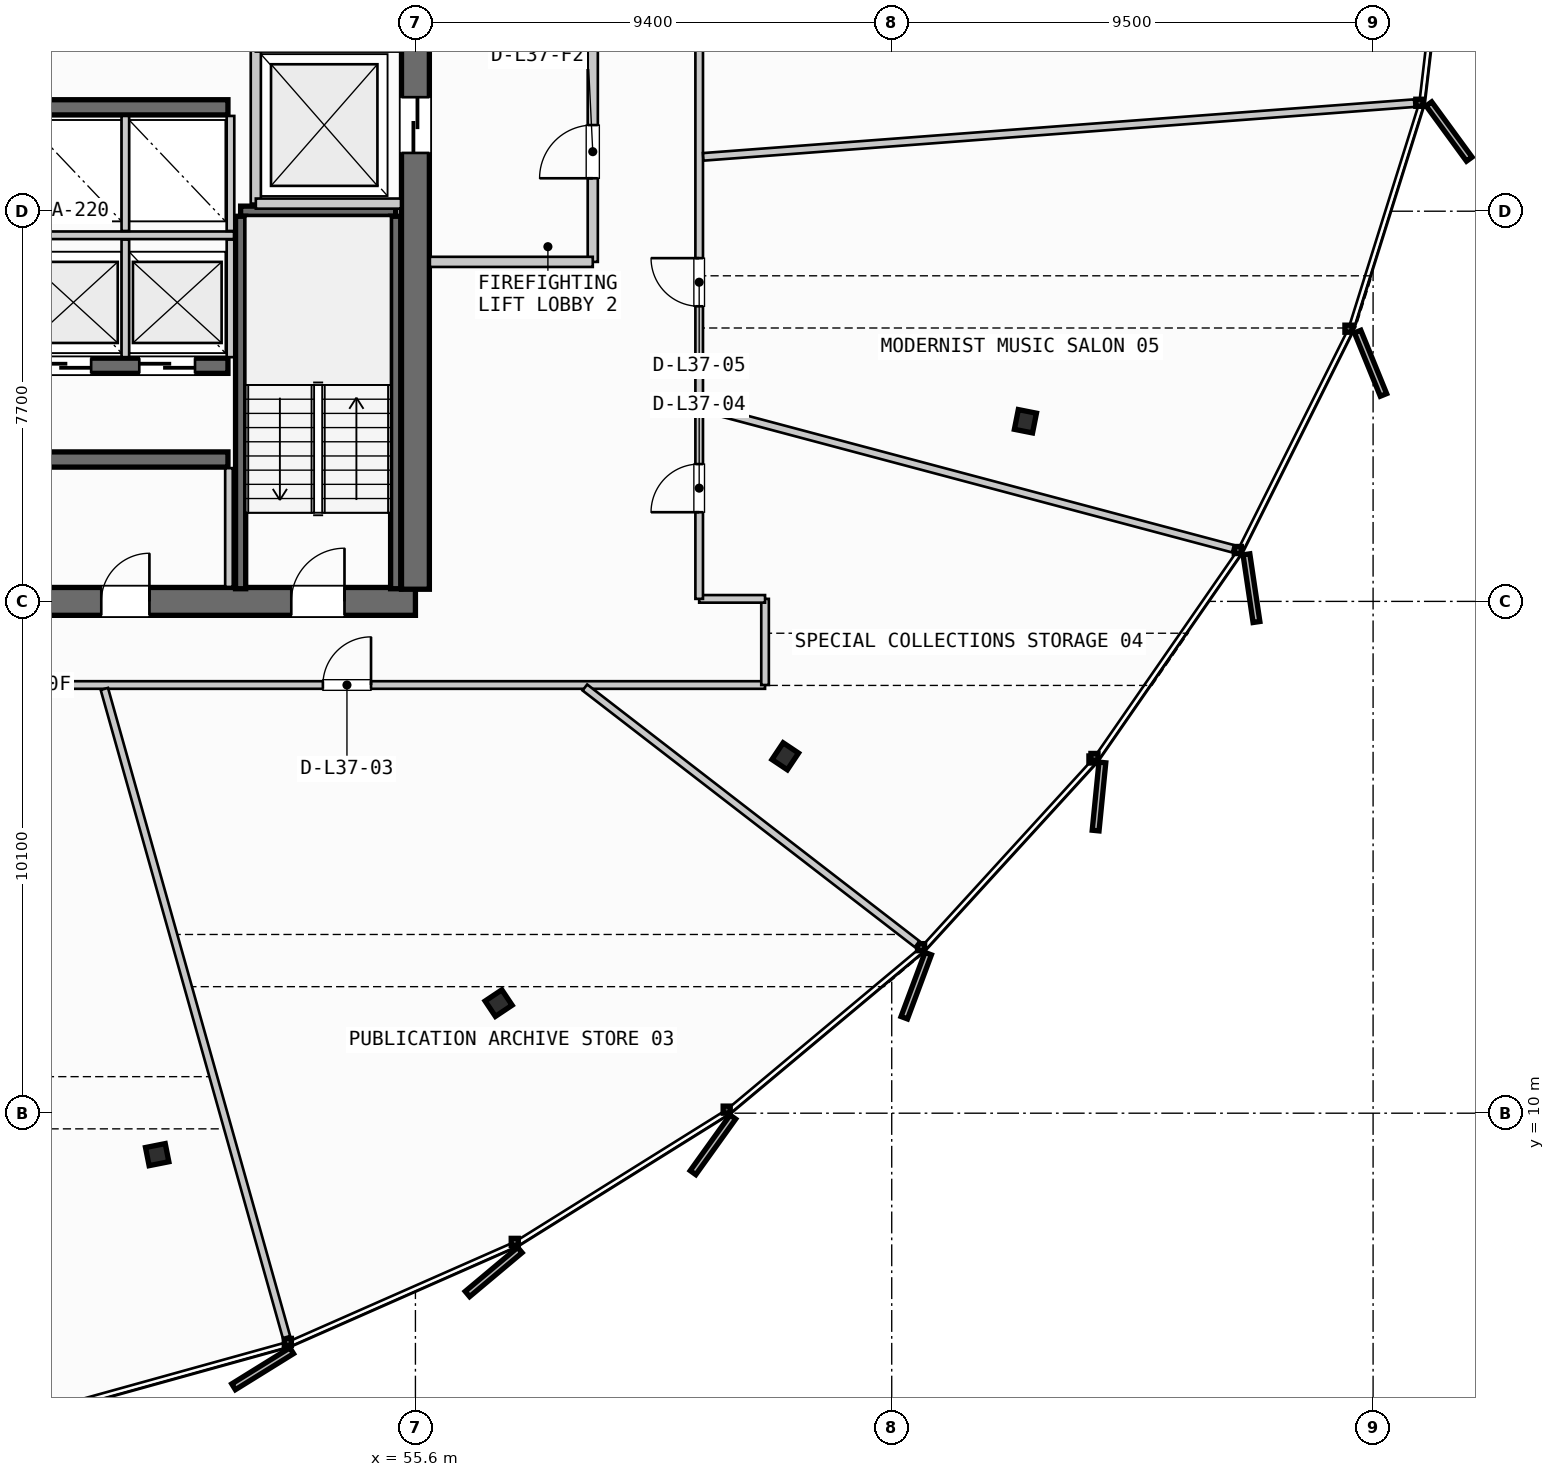
"""IFC4 building model, lengths in metres.
Left out: names, types, materials, properties, quantities, classifications, styles, units other than length and angle.
Written with IfcOpenShell. Run it as: python <this file> out.ifc"""

import sys

from ifc_helpers import new_model, si_unit, direction, frame, frame_2d, origin, origin_2d, place, context, subcontext, project, spatial, rectangle, i_section, extrude, source, transform, mapped, element, fill, save


model = new_model("IFC4")
c1 = context("Model", 3, precision=1e-05, world=origin(), true_north=direction((0.0, 1.0)))
c2 = subcontext(c1, "Body", "Model", "MODEL_VIEW")
j1 = project(units=[si_unit("LENGTHUNIT", "METRE"), si_unit("PLANEANGLEUNIT", "RADIAN")], contexts=[c1])
p1 = place(None, origin())
s1 = spatial("IfcSite", under=j1, at=p1, CompositionType="ELEMENT")
p2 = place(p1, origin())
s2 = spatial("IfcBuilding", under=s1, at=p2, CompositionType="ELEMENT")
p3 = place(p2, frame((0.0, 0.0, 146.55)))
s3 = spatial("IfcBuildingStorey", under=s2, at=p3, CompositionType="ELEMENT", Elevation=146.55)
p4 = place(p3, frame((38.0, 20.1, 0.0), z_axis=(0.0, 0.0, 1.0), x_axis=(1.0, 0.0, 0.0)))
e1 = element("IfcWall", 1, at=p4, inside=s3, PredefinedType="SHEAR", context=c2, shape_type="SweptSolid", body=[
    extrude(rectangle(XDim=17.6, YDim=0.55, at=frame_2d((8.8, 0.0))), origin(), (0.0, 0.0, 1.0), 3.3),
])
p5 = place(p4, frame((1.4, 0.0, 0.0)))
e2 = element("IfcOpeningElement", 2, at=p5, cuts=e1, PredefinedType="OPENING", context=c2, shape_type="SweptSolid", body=[
    extrude(rectangle(XDim=1.05, YDim=2.15, at=frame_2d((0.525, 1.075))), frame((0.0, 0.285, 0.0), z_axis=(0.0, -1.0, 0.0), x_axis=(1.0, 0.0, 0.0)), (0.0, 0.0, 1.0), 0.57),
])
p6 = place(p4, frame((15.15, 0.0, 0.0)))
e3 = element("IfcOpeningElement", 3, at=p6, cuts=e1, PredefinedType="OPENING", context=c2, shape_type="SweptSolid", body=[
    extrude(rectangle(XDim=1.05, YDim=2.15, at=frame_2d((0.525, 1.075))), frame((0.0, 0.285, 0.0), z_axis=(0.0, -1.0, 0.0), x_axis=(1.0, 0.0, 0.0)), (0.0, 0.0, 1.0), 0.57),
])
p7 = place(p4, frame((5.25, 0.0, 0.0)))
e4 = element("IfcOpeningElement", 4, at=p7, cuts=e1, PredefinedType="OPENING", context=c2, shape_type="SweptSolid", body=[
    extrude(rectangle(XDim=0.95, YDim=2.15, at=frame_2d((0.475, 1.075))), frame((0.0, 0.285, 0.0), z_axis=(0.0, -1.0, 0.0), x_axis=(1.0, 0.0, 0.0)), (0.0, 0.0, 1.0), 0.57),
])
p8 = place(p4, frame((11.4, 0.0, 0.0)))
e5 = element("IfcOpeningElement", 5, at=p8, cuts=e1, PredefinedType="OPENING", context=c2, shape_type="SweptSolid", body=[
    extrude(rectangle(XDim=0.95, YDim=2.15, at=frame_2d((0.475, 1.075))), frame((0.0, 0.285, 0.0), z_axis=(0.0, -1.0, 0.0), x_axis=(1.0, 0.0, 0.0)), (0.0, 0.0, 1.0), 0.57),
])
p9 = place(p3, frame((55.6, 20.34, 0.0), z_axis=(0.0, 0.0, 1.0), x_axis=(0.0, 1.0, 0.0)))
e6 = element("IfcWall", 6, at=p9, inside=s3, PredefinedType="SHEAR", context=c2, shape_type="SweptSolid", body=[
    extrude(rectangle(XDim=14.92, YDim=0.55, at=frame_2d((7.46, 0.0))), origin(), (0.0, 0.0, 1.0), 3.3),
])
p10 = place(p9, frame((12.71, 0.0, 0.0)))
e7 = element("IfcOpeningElement", 7, at=p10, cuts=e6, PredefinedType="OPENING", context=c2, shape_type="SweptSolid", body=[
    extrude(rectangle(XDim=1.05, YDim=2.15, at=frame_2d((0.525, 1.075))), frame((0.0, 0.285, 0.0), z_axis=(0.0, -1.0, 0.0), x_axis=(1.0, 0.0, 0.0)), (0.0, 0.0, 1.0), 0.57),
])
p11 = place(p9, frame((8.61, 0.0, 0.0)))
e8 = element("IfcOpeningElement", 8, at=p11, cuts=e6, PredefinedType="OPENING", context=c2, shape_type="SweptSolid", body=[
    extrude(rectangle(XDim=1.1, YDim=2.2, at=frame_2d((0.55, 1.1))), frame((0.0, 0.285, 0.0), z_axis=(0.0, -1.0, 0.0), x_axis=(1.0, 0.0, 0.0)), (0.0, 0.0, 1.0), 0.57),
])
p12 = place(p3, frame((47.65, 22.9, 0.0), z_axis=(0.0, 0.0, 1.0), x_axis=(1.0, 0.0, 0.0)))
e9 = element("IfcWall", 9, at=p12, inside=s3, PredefinedType="SHEAR", context=c2, shape_type="SweptSolid", body=[
    extrude(rectangle(XDim=4.25, YDim=0.3, at=frame_2d((2.125, 0.0))), origin(), (0.0, 0.0, 1.0), 3.3),
])
p13 = place(p3, frame((47.65, 24.75, 0.0), z_axis=(0.0, 0.0, 1.0), x_axis=(1.0, 0.0, 0.0)))
e10 = element("IfcWall", 10, at=p13, inside=s3, PredefinedType="SHEAR", context=c2, shape_type="SweptSolid", body=[
    extrude(rectangle(XDim=4.25, YDim=0.3, at=frame_2d((2.125, 0.0))), origin(), (0.0, 0.0, 1.0), 3.3),
])
p14 = place(p13, frame((0.45, 0.0, 0.0)))
e11 = element("IfcOpeningElement", 11, at=p14, cuts=e10, PredefinedType="OPENING", context=c2, shape_type="SweptSolid", body=[
    extrude(rectangle(XDim=1.1, YDim=2.2, at=frame_2d((0.55, 1.1))), frame((0.0, 0.16, 0.0), z_axis=(0.0, -1.0, 0.0), x_axis=(1.0, 0.0, 0.0)), (0.0, 0.0, 1.0), 0.32),
])
p15 = place(p13, frame((2.5, 0.0, 0.0)))
e12 = element("IfcOpeningElement", 12, at=p15, cuts=e10, PredefinedType="OPENING", context=c2, shape_type="SweptSolid", body=[
    extrude(rectangle(XDim=1.1, YDim=2.2, at=frame_2d((0.55, 1.1))), frame((0.0, 0.16, 0.0), z_axis=(0.0, -1.0, 0.0), x_axis=(1.0, 0.0, 0.0)), (0.0, 0.0, 1.0), 0.32),
])
p16 = place(p3, frame((47.65, 29.85, 0.0), z_axis=(0.0, 0.0, 1.0), x_axis=(1.0, 0.0, 0.0)))
e13 = element("IfcWall", 13, at=p16, inside=s3, PredefinedType="SHEAR", context=c2, shape_type="SweptSolid", body=[
    extrude(rectangle(XDim=4.25, YDim=0.3, at=frame_2d((2.125, 0.0))), origin(), (0.0, 0.0, 1.0), 3.3),
])
m1 = source(origin(), c2, "Body", "SweptSolid", [
    extrude(i_section(OverallWidth=0.397, OverallDepth=0.365, WebThickness=0.028, FlangeThickness=0.044, FilletRadius=0.015, at=origin_2d()), origin(), (0.0, 0.0, 1.0), 3.3),
])
for number, where, z_axis, x_axis in (
    (14, (50.503, 9.182, 0.0), (0.0, 0.0, 1.0), (0.195, -0.981, 0.0)),
    (15, (57.242, 12.172, 0.0), (0.0, 0.0, 1.0), (0.556, -0.831, 0.0)),
    (16, (62.899, 17.043, 0.0), (0.0, 0.0, 1.0), (0.831, -0.556, 0.0)),
    (17, (67.639, 23.655, 0.0), (0.0, 0.0, 1.0), (0.981, -0.195, 0.0)),
):
    element("IfcColumn", number, at=place(p3, frame(where, z_axis=z_axis, x_axis=x_axis)), inside=s3, PredefinedType="COLUMN", context=c2, shape_type="MappedRepresentation", body=[
        mapped(m1, transform((0.0, 0.0, 0.0), scale=1.0)),
    ])
p17 = place(p3, frame((52.15, 27.8, 0.0), z_axis=(0.0, 0.0, 1.0), x_axis=(1.0, 0.0, 0.0)))
e18 = element("IfcWall", 18, at=p17, inside=s3, PredefinedType="SHEAR", context=c2, shape_type="SweptSolid", body=[
    extrude(rectangle(XDim=3.06, YDim=0.2, at=frame_2d((1.53, 0.0))), origin(), (0.0, 0.0, 1.0), 3.3),
])
for number, where, z_axis, x_axis in (
    (19, (55.21, 27.7, 0.0), (0.0, 0.0, 1.0), (0.0, -1.0, 0.0)),
    (20, (52.15, 20.35, 0.0), (0.0, 0.0, 1.0), (0.0, 1.0, 0.0)),
):
    element("IfcWall", number, at=place(p3, frame(where, z_axis=z_axis, x_axis=x_axis)), inside=s3, PredefinedType="SHEAR", context=c2, shape_type="SweptSolid", body=[
        extrude(rectangle(XDim=7.35, YDim=0.2, at=frame_2d((3.675, 0.0))), origin(), (0.0, 0.0, 1.0), 3.3),
    ])
p18 = place(p3, frame((52.45, 27.95, 0.0), z_axis=(0.0, 0.0, 1.0), x_axis=(0.0, 1.0, 0.0)))
e21 = element("IfcWall", 21, at=p18, inside=s3, PredefinedType="PARTITIONING", context=c2, shape_type="SweptSolid", body=[
    extrude(rectangle(XDim=3.1, YDim=0.2, at=frame_2d((1.55, 0.0))), origin(), (0.0, 0.0, 1.0), 2.305),
])
p19 = place(p3, frame((52.45, 27.95, 0.0), z_axis=(0.0, 0.0, 1.0), x_axis=(1.0, 0.0, 0.0)))
e22 = element("IfcWall", 22, at=p19, inside=s3, PredefinedType="PARTITIONING", context=c2, shape_type="SweptSolid", body=[
    extrude(rectangle(XDim=2.865, YDim=0.2, at=frame_2d((1.433, 0.0))), origin(), (0.0, 0.0, 1.0), 2.305),
])
p20 = place(p3, frame((59.1, 26.8, 0.0), z_axis=(0.0, 0.0, 1.0), x_axis=(0.0, 1.0, 0.0)))
e23 = element("IfcWall", 23, at=p20, inside=s3, PredefinedType="PARTITIONING", context=c2, shape_type="SweptSolid", body=[
    extrude(rectangle(XDim=4.4, YDim=0.2, at=frame_2d((2.2, 0.0))), origin(), (0.0, 0.0, 1.0), 2.305),
])
p21 = place(p20, frame((1.65, 0.0, 0.0)))
e24 = element("IfcOpeningElement", 24, at=p21, cuts=e23, PredefinedType="OPENING", context=c2, shape_type="SweptSolid", body=[
    extrude(rectangle(XDim=1.05, YDim=2.15, at=frame_2d((0.525, 1.075))), frame((0.0, 0.11, 0.0), z_axis=(0.0, -1.0, 0.0), x_axis=(1.0, 0.0, 0.0)), (0.0, 0.0, 1.0), 0.22),
])
p22 = place(p3, frame((55.885, 26.8, 0.0), z_axis=(0.0, 0.0, 1.0), x_axis=(1.0, 0.0, 0.0)))
e25 = element("IfcWall", 25, at=p22, inside=s3, PredefinedType="PARTITIONING", context=c2, shape_type="SweptSolid", body=[
    extrude(rectangle(XDim=3.215, YDim=0.2, at=frame_2d((1.607, 0.0))), origin(), (0.0, 0.0, 1.0), 2.305),
])
p23 = place(p3, frame((51.92, 20.385, 0.0), z_axis=(0.0, 0.0, 1.0), x_axis=(0.0, 1.0, 0.0)))
e26 = element("IfcWall", 26, at=p23, inside=s3, PredefinedType="PARTITIONING", context=c2, shape_type="SweptSolid", body=[
    extrude(rectangle(XDim=2.345, YDim=0.15, at=frame_2d((1.172, 0.0))), origin(), (0.0, 0.0, 1.0), 2.305),
])
p24 = place(p3, frame((47.7, 27.325, 0.0), z_axis=(0.0, 0.0, 1.0), x_axis=(1.0, 0.0, 0.0)))
e27 = element("IfcWall", 27, at=p24, inside=s3, PredefinedType="PARTITIONING", context=c2, shape_type="SweptSolid", body=[
    extrude(rectangle(XDim=4.32, YDim=0.15, at=frame_2d((2.16, 0.0))), origin(), (0.0, 0.0, 1.0), 2.305),
])
for number, where, z_axis, x_axis in (
    (28, (49.875, 24.92, 0.0), (0.0, 0.0, 1.0), (0.0, 1.0, 0.0)),
    (29, (51.95, 24.92, 0.0), (0.0, 0.0, 1.0), (0.0, 1.0, 0.0)),
):
    element("IfcWall", number, at=place(p3, frame(where, z_axis=z_axis, x_axis=x_axis)), inside=s3, PredefinedType="PARTITIONING", context=c2, shape_type="SweptSolid", body=[
        extrude(rectangle(XDim=2.32, YDim=0.15, at=frame_2d((1.16, 0.0))), origin(), (0.0, 0.0, 1.0), 2.305),
    ])
for number, where, z_axis, x_axis in (
    (30, (49.875, 27.41, 0.0), (0.0, 0.0, 1.0), (0.0, 1.0, 0.0)),
    (31, (51.95, 27.41, 0.0), (0.0, 0.0, 1.0), (0.0, 1.0, 0.0)),
):
    element("IfcWall", number, at=place(p3, frame(where, z_axis=z_axis, x_axis=x_axis)), inside=s3, PredefinedType="PARTITIONING", context=c2, shape_type="SweptSolid", body=[
        extrude(rectangle(XDim=2.27, YDim=0.15, at=frame_2d((1.135, 0.0))), origin(), (0.0, 0.0, 1.0), 2.305),
    ])
p25 = place(p3, frame((31.1, 18.45, 0.0), z_axis=(0.0, 0.0, 1.0), x_axis=(1.0, 0.0, 0.0)))
e32 = element("IfcWall", 32, at=p25, inside=s3, PredefinedType="PARTITIONING", context=c2, shape_type="SweptSolid", body=[
    extrude(rectangle(XDim=31.4, YDim=0.15, at=frame_2d((15.7, 0.0))), origin(), (0.0, 0.0, 1.0), 2.305),
])
p26 = place(p25, frame((6.281, 0.0, 0.0)))
e33 = element("IfcOpeningElement", 33, at=p26, cuts=e32, PredefinedType="OPENING", context=c2, shape_type="SweptSolid", body=[
    extrude(rectangle(XDim=0.95, YDim=2.15, at=frame_2d((0.475, 1.075))), frame((0.0, 0.085, 0.0), z_axis=(0.0, -1.0, 0.0), x_axis=(1.0, 0.0, 0.0)), (0.0, 0.0, 1.0), 0.17),
])
p27 = place(p25, frame((14.09, 0.0, 0.0)))
e34 = element("IfcOpeningElement", 34, at=p27, cuts=e32, PredefinedType="OPENING", context=c2, shape_type="SweptSolid", body=[
    extrude(rectangle(XDim=0.95, YDim=2.15, at=frame_2d((0.475, 1.075))), frame((0.0, 0.085, 0.0), z_axis=(0.0, -1.0, 0.0), x_axis=(1.0, 0.0, 0.0)), (0.0, 0.0, 1.0), 0.17),
])
p28 = place(p25, frame((22.674, 0.0, 0.0)))
e35 = element("IfcOpeningElement", 35, at=p28, cuts=e32, PredefinedType="OPENING", context=c2, shape_type="SweptSolid", body=[
    extrude(rectangle(XDim=0.95, YDim=2.15, at=frame_2d((0.475, 1.075))), frame((0.0, 0.085, 0.0), z_axis=(0.0, -1.0, 0.0), x_axis=(1.0, 0.0, 0.0)), (0.0, 0.0, 1.0), 0.17),
])
p29 = place(p3, frame((62.5, 18.45, 0.0), z_axis=(0.0, 0.0, 1.0), x_axis=(0.0, 1.0, 0.0)))
e36 = element("IfcWall", 36, at=p29, inside=s3, PredefinedType="PARTITIONING", context=c2, shape_type="SweptSolid", body=[
    extrude(rectangle(XDim=1.7, YDim=0.15, at=frame_2d((0.85, 0.0))), origin(), (0.0, 0.0, 1.0), 2.305),
])
p30 = place(p3, frame((62.5, 20.15, 0.0), z_axis=(0.0, 0.0, 1.0), x_axis=(-1.0, 0.0, 0.0)))
e37 = element("IfcWall", 37, at=p30, inside=s3, PredefinedType="PARTITIONING", context=c2, shape_type="SweptSolid", body=[
    extrude(rectangle(XDim=1.3, YDim=0.15, at=frame_2d((0.65, 0.0))), origin(), (0.0, 0.0, 1.0), 2.305),
])
p31 = place(p3, frame((61.2, 20.15, 0.0), z_axis=(0.0, 0.0, 1.0), x_axis=(0.0, 1.0, 0.0)))
e38 = element("IfcWall", 38, at=p31, inside=s3, PredefinedType="PARTITIONING", context=c2, shape_type="SweptSolid", body=[
    extrude(rectangle(XDim=15.3, YDim=0.15, at=frame_2d((7.65, 0.0))), origin(), (0.0, 0.0, 1.0), 2.305),
])
p32 = place(p31, frame((1.71, 0.0, 0.0)))
e39 = element("IfcOpeningElement", 39, at=p32, cuts=e38, PredefinedType="OPENING", context=c2, shape_type="SweptSolid", body=[
    extrude(rectangle(XDim=0.95, YDim=2.15, at=frame_2d((0.475, 1.075))), frame((0.0, 0.085, 0.0), z_axis=(0.0, -1.0, 0.0), x_axis=(1.0, 0.0, 0.0)), (0.0, 0.0, 1.0), 0.17),
])
p33 = place(p31, frame((5.774, 0.0, 0.0)))
e40 = element("IfcOpeningElement", 40, at=p33, cuts=e38, PredefinedType="OPENING", context=c2, shape_type="SweptSolid", body=[
    extrude(rectangle(XDim=0.95, YDim=2.15, at=frame_2d((0.475, 1.075))), frame((0.0, 0.085, 0.0), z_axis=(0.0, -1.0, 0.0), x_axis=(1.0, 0.0, 0.0)), (0.0, 0.0, 1.0), 0.17),
])
p34 = place(p31, frame((11.243, 0.0, 0.0)))
e41 = element("IfcOpeningElement", 41, at=p34, cuts=e38, PredefinedType="OPENING", context=c2, shape_type="SweptSolid", body=[
    extrude(rectangle(XDim=0.95, YDim=2.15, at=frame_2d((0.475, 1.075))), frame((0.0, 0.085, 0.0), z_axis=(0.0, -1.0, 0.0), x_axis=(1.0, 0.0, 0.0)), (0.0, 0.0, 1.0), 0.17),
])
p35 = place(p3, frame((49.461, 18.373, 0.0), z_axis=(0.0, 0.0, 1.0), x_axis=(0.270512485331, -0.962716466713, 0.0)))
e42 = element("IfcWall", 42, at=p35, inside=s3, PredefinedType="PARTITIONING", context=c2, shape_type="SweptSolid", body=[
    extrude(rectangle(XDim=13.286, YDim=0.15, at=frame_2d((6.643, 0.0))), origin(), (0.0, 0.0, 1.0), 2.305),
])
p36 = place(p3, frame((58.944, 18.401, 0.0), z_axis=(0.0, 0.0, 1.0), x_axis=(0.791453494342, -0.611229389259, 0.0)))
e43 = element("IfcWall", 43, at=p36, inside=s3, PredefinedType="PARTITIONING", context=c2, shape_type="SweptSolid", body=[
    extrude(rectangle(XDim=8.284, YDim=0.15, at=frame_2d((4.142, 0.0))), origin(), (0.0, 0.0, 1.0), 2.305),
])
p37 = place(p3, frame((61.277, 23.92, 0.0), z_axis=(0.0, 0.0, 1.0), x_axis=(0.96642193868, -0.25696037912, 0.0)))
e44 = element("IfcWall", 44, at=p37, inside=s3, PredefinedType="PARTITIONING", context=c2, shape_type="SweptSolid", body=[
    extrude(rectangle(XDim=10.82, YDim=0.15, at=frame_2d((5.41, 0.0))), origin(), (0.0, 0.0, 1.0), 2.305),
])
p38 = place(p3, frame((61.28, 28.873, 0.0), z_axis=(0.0, 0.0, 1.0), x_axis=(0.997160459413, 0.075306162981, 0.0)))
e45 = element("IfcWall", 45, at=p38, inside=s3, PredefinedType="PARTITIONING", context=c2, shape_type="SweptSolid", body=[
    extrude(rectangle(XDim=14.073, YDim=0.15, at=frame_2d((7.037, 0.0))), origin(), (0.0, 0.0, 1.0), 2.305),
])
m2 = source(origin(), c2, "Body", "SweptSolid", [
    extrude(rectangle(XDim=1.05, YDim=2.15, at=frame_2d((0.525, 1.075))), frame((0.0, 0.025, 0.0), z_axis=(0.0, -1.0, 0.0), x_axis=(1.0, 0.0, 0.0)), (0.0, 0.0, 1.0), 0.05),
])
p39 = place(p6, origin())
e46 = element("IfcDoor", 46, at=p39, inside=s3, OperationType="SINGLE_SWING_RIGHT", PredefinedType="DOOR", context=c2, shape_type="MappedRepresentation", body=[
    mapped(m2, transform((0.0, 0.0, 0.0), scale=1.0)),
])
fill(e3, e46)
m3 = source(origin(), c2, "Body", "SweptSolid", [
    extrude(rectangle(XDim=1.1, YDim=2.2, at=frame_2d((0.55, 1.1))), frame((0.0, 0.025, 0.0), z_axis=(0.0, -1.0, 0.0), x_axis=(1.0, 0.0, 0.0)), (0.0, 0.0, 1.0), 0.05),
])
p40 = place(p11, origin())
e47 = element("IfcDoor", 47, at=p40, inside=s3, OperationType="SLIDING_TO_RIGHT", PredefinedType="DOOR", context=c2, shape_type="MappedRepresentation", body=[
    mapped(m3, transform((0.0, 0.0, 0.0), scale=1.0)),
])
fill(e8, e47)
m4 = source(origin(), c2, "Body", "SweptSolid", [
    extrude(rectangle(XDim=0.95, YDim=2.15, at=frame_2d((0.475, 1.075))), frame((0.0, 0.025, 0.0), z_axis=(0.0, -1.0, 0.0), x_axis=(1.0, 0.0, 0.0)), (0.0, 0.0, 1.0), 0.05),
])
p41 = place(p8, origin())
e48 = element("IfcDoor", 48, at=p41, inside=s3, OperationType="SINGLE_SWING_RIGHT", PredefinedType="DOOR", context=c2, shape_type="MappedRepresentation", body=[
    mapped(m4, transform((0.0, 0.0, 0.0), scale=1.0)),
])
fill(e5, e48)
p42 = place(p14, origin())
e49 = element("IfcDoor", 49, at=p42, inside=s3, OperationType="SLIDING_TO_RIGHT", PredefinedType="DOOR", context=c2, shape_type="MappedRepresentation", body=[
    mapped(m3, transform((0.0, 0.0, 0.0), scale=1.0)),
])
fill(e11, e49)
p43 = place(p15, origin())
e50 = element("IfcDoor", 50, at=p43, inside=s3, OperationType="SLIDING_TO_RIGHT", PredefinedType="DOOR", context=c2, shape_type="MappedRepresentation", body=[
    mapped(m3, transform((0.0, 0.0, 0.0), scale=1.0)),
])
fill(e12, e50)
p44 = place(p21, origin())
e51 = element("IfcDoor", 51, at=p44, inside=s3, OperationType="SINGLE_SWING_LEFT", PredefinedType="DOOR", context=c2, shape_type="MappedRepresentation", body=[
    mapped(m2, transform((0.0, 0.0, 0.0), scale=1.0)),
])
fill(e24, e51)
p45 = place(p28, origin())
e52 = element("IfcDoor", 52, at=p45, inside=s3, OperationType="SINGLE_SWING_RIGHT", PredefinedType="DOOR", context=c2, shape_type="MappedRepresentation", body=[
    mapped(m4, transform((0.0, 0.0, 0.0), scale=1.0)),
])
fill(e35, e52)
p46 = place(p32, origin())
e53 = element("IfcDoor", 53, at=p46, inside=s3, OperationType="SINGLE_SWING_LEFT", PredefinedType="DOOR", context=c2, shape_type="MappedRepresentation", body=[
    mapped(m4, transform((0.0, 0.0, 0.0), scale=1.0)),
])
fill(e39, e53)
p47 = place(p33, origin())
e54 = element("IfcDoor", 54, at=p47, inside=s3, OperationType="SINGLE_SWING_RIGHT", PredefinedType="DOOR", context=c2, shape_type="MappedRepresentation", body=[
    mapped(m4, transform((0.0, 0.0, 0.0), scale=1.0)),
])
fill(e40, e54)
save(model, sys.argv[1])
